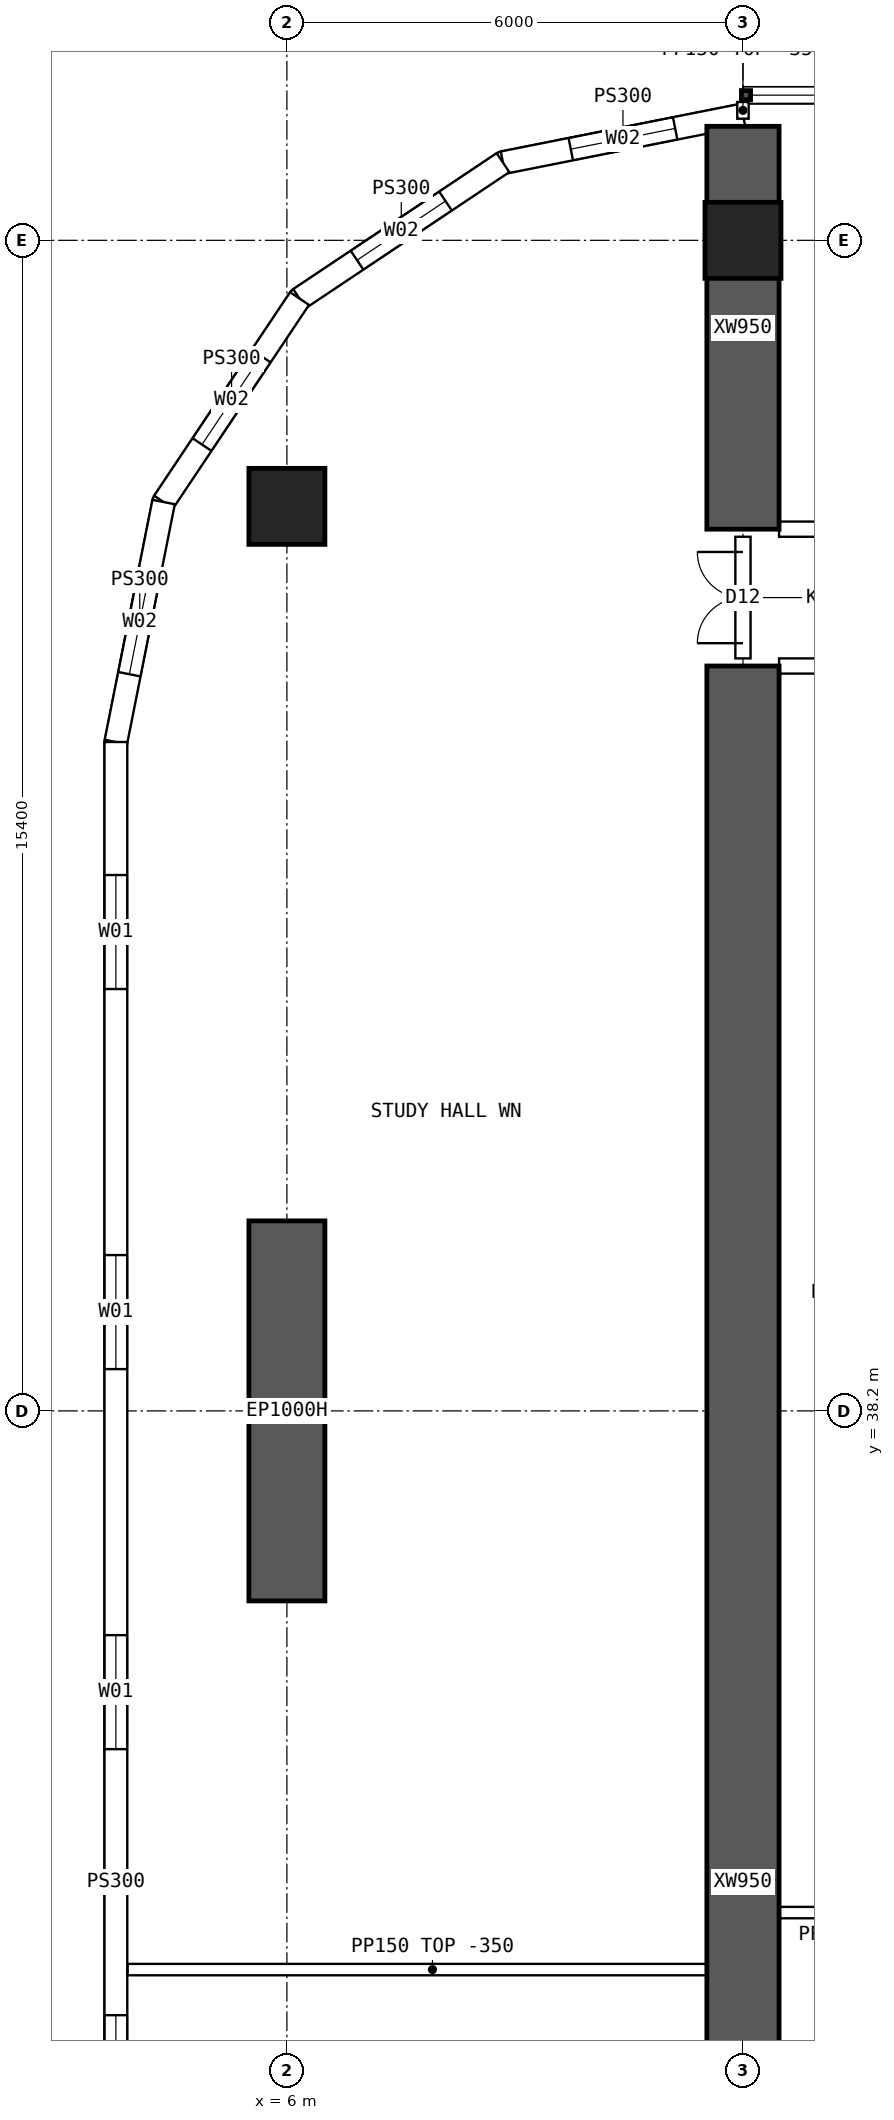
"""IFC4 building model, lengths in metres.
Left out: names, types, materials, properties, quantities, classifications, styles, units other than length and angle.
Written with IfcOpenShell. Run it as: python <this file> out.ifc"""

import sys

from ifc_helpers import new_model, si_unit, direction, frame, frame_2d, origin, origin_2d, place, context, subcontext, project, spatial, polyline, rectangle, hollow_rectangle, outline, extrude, element, fill, save


model = new_model("IFC4")
c1 = context("Model", 3, precision=1e-05, world=origin(), true_north=direction((0.0, 1.0)))
c2 = subcontext(c1, "Body", "Model", "MODEL_VIEW")
j1 = project(units=[si_unit("LENGTHUNIT", "METRE"), si_unit("PLANEANGLEUNIT", "RADIAN")], contexts=[c1])
p1 = place(None, origin())
s1 = spatial("IfcSite", under=j1, at=p1, CompositionType="ELEMENT")
p2 = place(p1, origin())
s2 = spatial("IfcBuilding", under=s1, at=p2, CompositionType="ELEMENT")
p3 = place(p2, frame((0.0, 0.0, 129.4)))
s3 = spatial("IfcBuildingStorey", under=s2, at=p3, CompositionType="ELEMENT", Elevation=129.4)
for number, where, z_axis, x_axis in (
    (1, (12.0, 53.6, 0.0), (0.0, 0.0, 1.0), (1.0, 0.0, 0.0)),
    (2, (6.0, 50.1, 0.0), (0.0, 0.0, 1.0), (1.0, 0.0, 0.0)),
):
    element("IfcColumn", number, at=place(p3, frame(where, z_axis=z_axis, x_axis=x_axis)), inside=s3, PredefinedType="COLUMN", context=c2, shape_type="SweptSolid", body=[
        extrude(hollow_rectangle(XDim=1.0, YDim=1.0, WallThickness=0.1, at=origin_2d()), origin(), (0.0, 0.0, 1.0), 3.75),
    ])
p4 = place(p3, frame((6.0, 35.7, 0.0), z_axis=(0.0, 0.0, 1.0), x_axis=(0.0, 1.0, 0.0)))
e3 = element("IfcWall", 3, at=p4, inside=s3, PredefinedType="SHEAR", context=c2, shape_type="SweptSolid", body=[
    extrude(rectangle(XDim=5.0, YDim=1.0, at=frame_2d((2.5, 0.0))), origin(), (0.0, 0.0, 1.0), 3.75),
])
p5 = place(p3, frame((12.0, 49.8, 0.0), z_axis=(0.0, 0.0, 1.0), x_axis=(0.0, 1.0, 0.0)))
e4 = element("IfcWall", 4, at=p5, inside=s3, PredefinedType="SHEAR", context=c2, shape_type="SweptSolid", body=[
    extrude(rectangle(XDim=5.3, YDim=0.95, at=frame_2d((2.65, 0.0))), origin(), (0.0, 0.0, 1.0), 3.75),
])
p6 = place(p3, frame((12.0, 16.0, 0.0), z_axis=(0.0, 0.0, 1.0), x_axis=(0.0, 1.0, 0.0)))
e5 = element("IfcWall", 5, at=p6, inside=s3, PredefinedType="SHEAR", context=c2, shape_type="SweptSolid", body=[
    extrude(rectangle(XDim=32.0, YDim=0.95, at=frame_2d((16.0, 0.0))), origin(), (0.0, 0.0, 1.0), 3.75),
])
p7 = place(p3, frame((3.75, 47.0, 0.0), z_axis=(0.0, 0.0, 1.0), x_axis=(0.0, -1.0, 0.0)))
e6 = element("IfcWall", 6, at=p7, inside=s3, PredefinedType="SOLIDWALL", context=c2, shape_type="SweptSolid", body=[
    extrude(outline(polyline([(-0.015, -0.15), (30.015, -0.15), (29.985, 0.15), (0.015, 0.15), (-0.015, -0.15)])), origin(), (0.0, 0.0, 1.0), 3.4),
])
p8 = place(p7, frame((1.75, 0.0, 0.9)))
e7 = element("IfcOpeningElement", 7, at=p8, cuts=e6, PredefinedType="OPENING", context=c2, shape_type="SweptSolid", body=[
    extrude(rectangle(XDim=1.5, YDim=2.0, at=frame_2d((0.75, 1.0))), frame((0.0, 0.16, 0.0), z_axis=(0.0, -1.0, 0.0), x_axis=(1.0, 0.0, 0.0)), (0.0, 0.0, 1.0), 0.32),
])
p9 = place(p7, frame((6.75, 0.0, 0.9)))
e8 = element("IfcOpeningElement", 8, at=p9, cuts=e6, PredefinedType="OPENING", context=c2, shape_type="SweptSolid", body=[
    extrude(rectangle(XDim=1.5, YDim=2.0, at=frame_2d((0.75, 1.0))), frame((0.0, 0.16, 0.0), z_axis=(0.0, -1.0, 0.0), x_axis=(1.0, 0.0, 0.0)), (0.0, 0.0, 1.0), 0.32),
])
p10 = place(p7, frame((11.75, 0.0, 0.9)))
e9 = element("IfcOpeningElement", 9, at=p10, cuts=e6, PredefinedType="OPENING", context=c2, shape_type="SweptSolid", body=[
    extrude(rectangle(XDim=1.5, YDim=2.0, at=frame_2d((0.75, 1.0))), frame((0.0, 0.16, 0.0), z_axis=(0.0, -1.0, 0.0), x_axis=(1.0, 0.0, 0.0)), (0.0, 0.0, 1.0), 0.32),
])
p11 = place(p7, frame((16.75, 0.0, 0.9)))
e10 = element("IfcOpeningElement", 10, at=p11, cuts=e6, PredefinedType="OPENING", context=c2, shape_type="SweptSolid", body=[
    extrude(rectangle(XDim=1.5, YDim=2.0, at=frame_2d((0.75, 1.0))), frame((0.0, 0.16, 0.0), z_axis=(0.0, -1.0, 0.0), x_axis=(1.0, 0.0, 0.0)), (0.0, 0.0, 1.0), 0.32),
])
p12 = place(p7, frame((21.75, 0.0, 0.9)))
e11 = element("IfcOpeningElement", 11, at=p12, cuts=e6, PredefinedType="OPENING", context=c2, shape_type="SweptSolid", body=[
    extrude(rectangle(XDim=1.5, YDim=2.0, at=frame_2d((0.75, 1.0))), frame((0.0, 0.16, 0.0), z_axis=(0.0, -1.0, 0.0), x_axis=(1.0, 0.0, 0.0)), (0.0, 0.0, 1.0), 0.32),
])
p13 = place(p7, frame((26.75, 0.0, 0.9)))
e12 = element("IfcOpeningElement", 12, at=p13, cuts=e6, PredefinedType="OPENING", context=c2, shape_type="SweptSolid", body=[
    extrude(rectangle(XDim=1.5, YDim=2.0, at=frame_2d((0.75, 1.0))), frame((0.0, 0.16, 0.0), z_axis=(0.0, -1.0, 0.0), x_axis=(1.0, 0.0, 0.0)), (0.0, 0.0, 1.0), 0.32),
])
p14 = place(p3, frame((12.0, 55.25, 0.0), z_axis=(0.0, 0.0, 1.0), x_axis=(-0.980787251524, -0.195080412259, 0.0)))
e13 = element("IfcWall", 13, at=p14, inside=s3, PredefinedType="SOLIDWALL", context=c2, shape_type="SweptSolid", body=[
    extrude(outline(polyline([(-0.03, -0.15), (3.249, -0.15), (3.189, 0.15), (0.03, 0.15), (-0.03, -0.15)])), origin(), (0.0, 0.0, 1.0), 3.4),
])
p15 = place(p14, frame((0.909, 0.0, 0.9)))
e14 = element("IfcOpeningElement", 14, at=p15, cuts=e13, PredefinedType="OPENING", context=c2, shape_type="SweptSolid", body=[
    extrude(rectangle(XDim=1.4, YDim=1.8, at=frame_2d((0.7, 0.9))), frame((0.0, 0.16, 0.0), z_axis=(0.0, -1.0, 0.0), x_axis=(1.0, 0.0, 0.0)), (0.0, 0.0, 1.0), 0.32),
])
p16 = place(p3, frame((8.843, 54.622, 0.0), z_axis=(0.0, 0.0, 1.0), x_axis=(-0.831443069936, -0.555609954424, 0.0)))
e15 = element("IfcWall", 15, at=p16, inside=s3, PredefinedType="SOLIDWALL", context=c2, shape_type="SweptSolid", body=[
    extrude(outline(polyline([(-0.03, -0.15), (3.249, -0.15), (3.189, 0.15), (0.03, 0.15), (-0.03, -0.15)])), origin(), (0.0, 0.0, 1.0), 3.4),
])
p17 = place(p16, frame((0.909, 0.0, 0.9)))
e16 = element("IfcOpeningElement", 16, at=p17, cuts=e15, PredefinedType="OPENING", context=c2, shape_type="SweptSolid", body=[
    extrude(rectangle(XDim=1.4, YDim=1.8, at=frame_2d((0.7, 0.9))), frame((0.0, 0.16, 0.0), z_axis=(0.0, -1.0, 0.0), x_axis=(1.0, 0.0, 0.0)), (0.0, 0.0, 1.0), 0.32),
])
p18 = place(p3, frame((6.167, 52.833, 0.0), z_axis=(0.0, 0.0, 1.0), x_axis=(-0.555609954424, -0.831443069936, 0.0)))
e17 = element("IfcWall", 17, at=p18, inside=s3, PredefinedType="SOLIDWALL", context=c2, shape_type="SweptSolid", body=[
    extrude(outline(polyline([(-0.03, -0.15), (3.249, -0.15), (3.189, 0.15), (0.03, 0.15), (-0.03, -0.15)])), origin(), (0.0, 0.0, 1.0), 3.4),
])
p19 = place(p18, frame((0.909, 0.0, 0.9)))
e18 = element("IfcOpeningElement", 18, at=p19, cuts=e17, PredefinedType="OPENING", context=c2, shape_type="SweptSolid", body=[
    extrude(rectangle(XDim=1.4, YDim=1.8, at=frame_2d((0.7, 0.9))), frame((0.0, 0.16, 0.0), z_axis=(0.0, -1.0, 0.0), x_axis=(1.0, 0.0, 0.0)), (0.0, 0.0, 1.0), 0.32),
])
p20 = place(p3, frame((4.378, 50.157, 0.0), z_axis=(0.0, 0.0, 1.0), x_axis=(-0.195080412259, -0.980787251524, 0.0)))
e19 = element("IfcWall", 19, at=p20, inside=s3, PredefinedType="SOLIDWALL", context=c2, shape_type="SweptSolid", body=[
    extrude(outline(polyline([(-0.03, -0.15), (3.234, -0.15), (3.204, 0.15), (0.03, 0.15), (-0.03, -0.15)])), origin(), (0.0, 0.0, 1.0), 3.4),
])
p21 = place(p20, frame((0.909, 0.0, 0.9)))
e20 = element("IfcOpeningElement", 20, at=p21, cuts=e19, PredefinedType="OPENING", context=c2, shape_type="SweptSolid", body=[
    extrude(rectangle(XDim=1.4, YDim=1.8, at=frame_2d((0.7, 0.9))), frame((0.0, 0.16, 0.0), z_axis=(0.0, -1.0, 0.0), x_axis=(1.0, 0.0, 0.0)), (0.0, 0.0, 1.0), 0.32),
])
p22 = place(p3, frame((12.475, 49.8, 0.0), z_axis=(0.0, 0.0, 1.0), x_axis=(1.0, 0.0, 0.0)))
e21 = element("IfcWall", 21, at=p22, inside=s3, PredefinedType="SOLIDWALL", context=c2, shape_type="SweptSolid", body=[
    extrude(outline(polyline([(0.0, 0.0), (5.05, 0.0), (5.05, 3.0), (0.0, 3.0), (0.0, 0.0)])), frame((0.0, 0.1, 0.0), z_axis=(0.0, -1.0, 0.0), x_axis=(1.0, 0.0, 0.0)), (0.0, 0.0, 1.0), 0.2),
])
p23 = place(p22, frame((0.6, 0.0, 0.0)))
e22 = element("IfcOpeningElement", 22, at=p23, cuts=e21, PredefinedType="OPENING", context=c2, shape_type="SweptSolid", body=[
    extrude(rectangle(XDim=1.0, YDim=2.1, at=frame_2d((0.5, 1.05))), frame((0.0, 0.11, 0.0), z_axis=(0.0, -1.0, 0.0), x_axis=(1.0, 0.0, 0.0)), (0.0, 0.0, 1.0), 0.22),
])
p24 = place(p3, frame((12.475, 48.0, 0.0), z_axis=(0.0, 0.0, 1.0), x_axis=(1.0, 0.0, 0.0)))
e23 = element("IfcWall", 23, at=p24, inside=s3, PredefinedType="SOLIDWALL", context=c2, shape_type="SweptSolid", body=[
    extrude(rectangle(XDim=5.05, YDim=0.2, at=frame_2d((2.525, 0.0))), origin(), (0.0, 0.0, 1.0), 3.4),
])
p25 = place(p24, frame((3.325, 0.0, 0.0)))
e24 = element("IfcOpeningElement", 24, at=p25, cuts=e23, PredefinedType="OPENING", context=c2, shape_type="SweptSolid", body=[
    extrude(rectangle(XDim=1.6, YDim=2.1, at=frame_2d((0.8, 1.05))), frame((0.0, 0.11, 0.0), z_axis=(0.0, -1.0, 0.0), x_axis=(1.0, 0.0, 0.0)), (0.0, 0.0, 1.0), 0.22),
])
p26 = place(p3, frame((12.0, 31.6, 0.0), z_axis=(0.0, 0.0, 1.0), x_axis=(1.0, 0.0, 0.0)))
e25 = element("IfcWall", 25, at=p26, inside=s3, PredefinedType="PARTITIONING", context=c2, shape_type="SweptSolid", body=[
    extrude(rectangle(XDim=3.6, YDim=0.15, at=frame_2d((1.8, 0.0))), origin(), (0.0, 0.0, 1.0), 3.4),
])
p27 = place(p3, frame((3.905, 30.85, 0.0), z_axis=(0.0, 0.0, 1.0), x_axis=(1.0, 0.0, 0.0)))
e26 = element("IfcWall", 26, at=p27, inside=s3, PredefinedType="PARTITIONING", context=c2, shape_type="SweptSolid", body=[
    extrude(outline(polyline([(0.0, 0.0), (8.02, 0.0), (8.02, 3.4), (2.397, 3.4), (2.395, 2.95), (1.797, 2.95), (1.795, 3.4), (0.0, 3.4), (0.0, 0.0)])), frame((0.0, 0.075, 0.0), z_axis=(0.0, -1.0, 0.0), x_axis=(1.0, 0.0, 0.0)), (0.0, 0.0, 1.0), 0.15),
])
p28 = place(p3, frame((12.0, 48.1, 0.0), z_axis=(0.0, 0.0, 1.0), x_axis=(0.0, 1.0, 0.0)))
e27 = element("IfcWall", 27, at=p28, inside=s3, PredefinedType="SOLIDWALL", context=c2, shape_type="SweptSolid", body=[
    extrude(outline(polyline([(0.0, 0.0), (1.6, 0.0), (1.6, 3.0), (0.0, 3.0), (0.0, 0.0)])), frame((0.0, 0.1, 0.0), z_axis=(0.0, -1.0, 0.0), x_axis=(1.0, 0.0, 0.0)), (0.0, 0.0, 1.0), 0.2),
])
p29 = place(p28, frame((0.2, 0.0, 0.0)))
e28 = element("IfcOpeningElement", 28, at=p29, cuts=e27, PredefinedType="OPENING", context=c2, shape_type="SweptSolid", body=[
    extrude(rectangle(XDim=1.2, YDim=2.1, at=frame_2d((0.6, 1.05))), frame((0.0, 0.11, 0.0), z_axis=(0.0, -1.0, 0.0), x_axis=(1.0, 0.0, 0.0)), (0.0, 0.0, 1.0), 0.22),
])
p30 = place(p3, frame((12.0, 55.2, 0.0), z_axis=(0.0, 0.0, 1.0), x_axis=(0.0, 1.0, 0.0)))
e29 = element("IfcWall", 29, at=p30, inside=s3, PredefinedType="PARTITIONING", context=c2, shape_type="SweptSolid", body=[
    extrude(rectangle(XDim=0.22, YDim=0.15, at=frame_2d((0.11, 0.0))), origin(), (0.0, 0.0, 1.0), 3.4),
])
p31 = place(p8, origin())
e30 = element("IfcWindow", 30, at=p31, inside=s3, PartitioningType="SINGLE_PANEL", PredefinedType="WINDOW", context=c2, shape_type="SweptSolid", body=[
    extrude(rectangle(XDim=1.5, YDim=2.0, at=frame_2d((0.75, 1.0))), frame((0.0, 0.03, 0.0), z_axis=(0.0, -1.0, 0.0), x_axis=(1.0, 0.0, 0.0)), (0.0, 0.0, 1.0), 0.06),
])
fill(e7, e30)
p32 = place(p9, origin())
e31 = element("IfcWindow", 31, at=p32, inside=s3, PartitioningType="SINGLE_PANEL", PredefinedType="WINDOW", context=c2, shape_type="SweptSolid", body=[
    extrude(rectangle(XDim=1.5, YDim=2.0, at=frame_2d((0.75, 1.0))), frame((0.0, 0.03, 0.0), z_axis=(0.0, -1.0, 0.0), x_axis=(1.0, 0.0, 0.0)), (0.0, 0.0, 1.0), 0.06),
])
fill(e8, e31)
p33 = place(p10, origin())
e32 = element("IfcWindow", 32, at=p33, inside=s3, PartitioningType="SINGLE_PANEL", PredefinedType="WINDOW", context=c2, shape_type="SweptSolid", body=[
    extrude(rectangle(XDim=1.5, YDim=2.0, at=frame_2d((0.75, 1.0))), frame((0.0, 0.03, 0.0), z_axis=(0.0, -1.0, 0.0), x_axis=(1.0, 0.0, 0.0)), (0.0, 0.0, 1.0), 0.06),
])
fill(e9, e32)
p34 = place(p11, origin())
e33 = element("IfcWindow", 33, at=p34, inside=s3, PartitioningType="SINGLE_PANEL", PredefinedType="WINDOW", context=c2, shape_type="SweptSolid", body=[
    extrude(rectangle(XDim=1.5, YDim=2.0, at=frame_2d((0.75, 1.0))), frame((0.0, 0.03, 0.0), z_axis=(0.0, -1.0, 0.0), x_axis=(1.0, 0.0, 0.0)), (0.0, 0.0, 1.0), 0.06),
])
fill(e10, e33)
p35 = place(p15, origin())
e34 = element("IfcWindow", 34, at=p35, inside=s3, PartitioningType="SINGLE_PANEL", PredefinedType="WINDOW", context=c2, shape_type="SweptSolid", body=[
    extrude(rectangle(XDim=1.4, YDim=1.8, at=frame_2d((0.7, 0.9))), frame((0.0, 0.03, 0.0), z_axis=(0.0, -1.0, 0.0), x_axis=(1.0, 0.0, 0.0)), (0.0, 0.0, 1.0), 0.06),
])
fill(e14, e34)
p36 = place(p17, origin())
e35 = element("IfcWindow", 35, at=p36, inside=s3, PartitioningType="SINGLE_PANEL", PredefinedType="WINDOW", context=c2, shape_type="SweptSolid", body=[
    extrude(rectangle(XDim=1.4, YDim=1.8, at=frame_2d((0.7, 0.9))), frame((0.0, 0.03, 0.0), z_axis=(0.0, -1.0, 0.0), x_axis=(1.0, 0.0, 0.0)), (0.0, 0.0, 1.0), 0.06),
])
fill(e16, e35)
p37 = place(p19, origin())
e36 = element("IfcWindow", 36, at=p37, inside=s3, PartitioningType="SINGLE_PANEL", PredefinedType="WINDOW", context=c2, shape_type="SweptSolid", body=[
    extrude(rectangle(XDim=1.4, YDim=1.8, at=frame_2d((0.7, 0.9))), frame((0.0, 0.03, 0.0), z_axis=(0.0, -1.0, 0.0), x_axis=(1.0, 0.0, 0.0)), (0.0, 0.0, 1.0), 0.06),
])
fill(e18, e36)
p38 = place(p21, origin())
e37 = element("IfcWindow", 37, at=p38, inside=s3, PartitioningType="SINGLE_PANEL", PredefinedType="WINDOW", context=c2, shape_type="SweptSolid", body=[
    extrude(rectangle(XDim=1.4, YDim=1.8, at=frame_2d((0.7, 0.9))), frame((0.0, 0.03, 0.0), z_axis=(0.0, -1.0, 0.0), x_axis=(1.0, 0.0, 0.0)), (0.0, 0.0, 1.0), 0.06),
])
fill(e20, e37)
p39 = place(p29, origin())
e38 = element("IfcDoor", 38, at=p39, inside=s3, OperationType="DOUBLE_DOOR_SINGLE_SWING", PredefinedType="DOOR", context=c2, shape_type="SweptSolid", body=[
    extrude(rectangle(XDim=1.2, YDim=2.1, at=frame_2d((0.6, 1.05))), frame((0.0, 0.025, 0.0), z_axis=(0.0, -1.0, 0.0), x_axis=(1.0, 0.0, 0.0)), (0.0, 0.0, 1.0), 0.05),
])
fill(e28, e38)
save(model, sys.argv[1])
